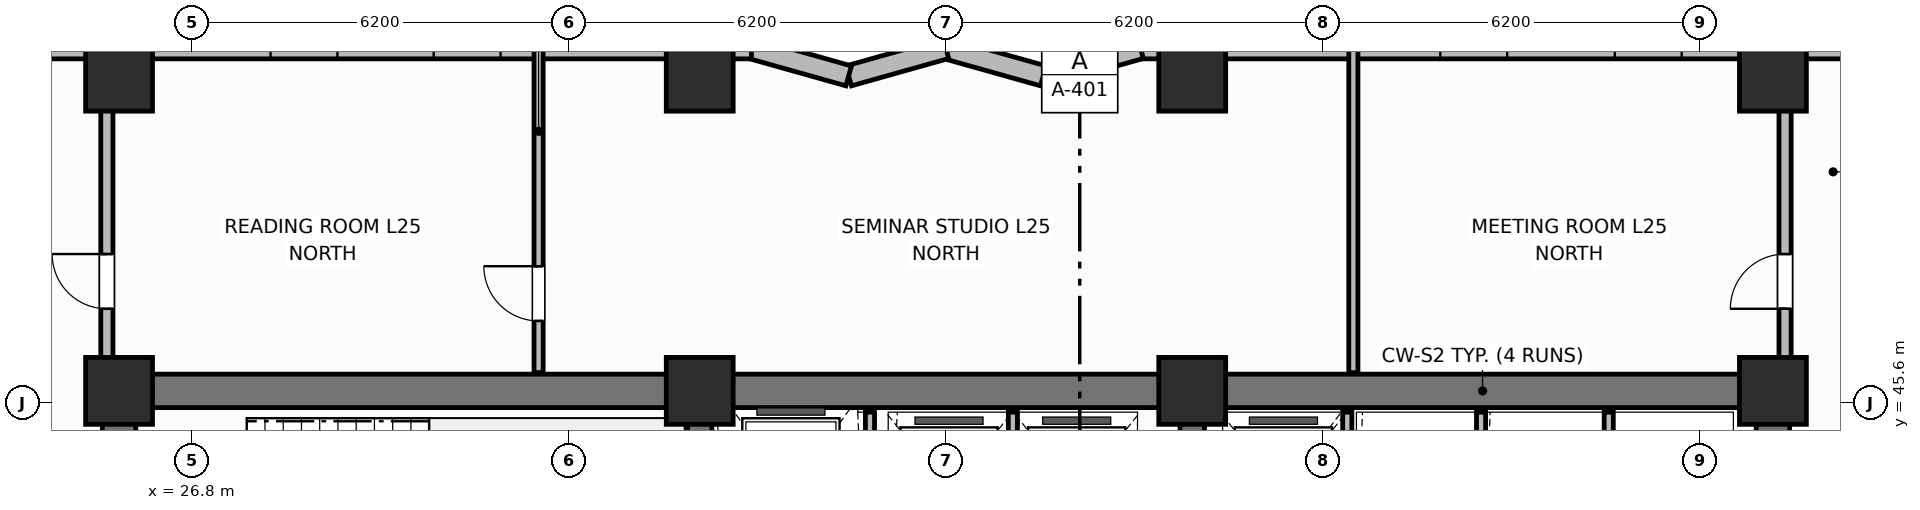
"""IFC4 building model, lengths in metres.
Left out: names, types, materials, properties, quantities, classifications, styles, units other than length and angle.
Written with IfcOpenShell. Run it as: python <this file> out.ifc"""

import sys

from ifc_helpers import new_model, si_unit, direction, frame, frame_2d, origin, origin_2d, place, context, subcontext, project, spatial, rectangle, extrude, element, fill, save


model = new_model("IFC4")
c1 = context("Model", 3, precision=1e-05, world=origin(), true_north=direction((0.0, 1.0)))
c2 = subcontext(c1, "Body", "Model", "MODEL_VIEW")
j1 = project(units=[si_unit("LENGTHUNIT", "METRE"), si_unit("PLANEANGLEUNIT", "RADIAN")], contexts=[c1])
p1 = place(None, origin())
s1 = spatial("IfcSite", under=j1, at=p1, CompositionType="ELEMENT")
p2 = place(p1, origin())
s2 = spatial("IfcBuilding", under=s1, at=p2, CompositionType="ELEMENT")
p3 = place(p2, frame((0.0, 0.0, 103.1)))
s3 = spatial("IfcBuildingStorey", under=s2, at=p3, CompositionType="ELEMENT", Elevation=103.1)
p4 = place(p3, frame((25.6, 45.8, 0.0), z_axis=(0.0, 0.0, 1.0), x_axis=(1.0, 0.0, 0.0)))
e1 = element("IfcWall", 1, at=p4, inside=s3, PredefinedType="SHEAR", context=c2, shape_type="SweptSolid", body=[
    extrude(rectangle(XDim=27.2, YDim=0.55, at=frame_2d((13.6, 0.0))), origin(), (0.0, 0.0, 1.0), 3.7),
])
for number, where, z_axis, x_axis in (
    (2, (25.6, 39.875, 0.0), (0.0, 0.0, 1.0), (0.0, 1.0, 0.0)),
    (3, (52.8, 39.875, 0.0), (0.0, 0.0, 1.0), (0.0, 1.0, 0.0)),
):
    element("IfcWall", number, at=place(p3, frame(where, z_axis=z_axis, x_axis=x_axis)), inside=s3, PredefinedType="SHEAR", context=c2, shape_type="SweptSolid", body=[
        extrude(rectangle(XDim=5.65, YDim=0.55, at=frame_2d((2.825, 0.0))), origin(), (0.0, 0.0, 1.0), 3.7),
    ])
for number, where, z_axis, x_axis in (
    (4, (35.15, 39.875, 0.0), (0.0, 0.0, 1.0), (0.0, 1.0, 0.0)),
    (5, (43.25, 39.875, 0.0), (0.0, 0.0, 1.0), (0.0, 1.0, 0.0)),
):
    element("IfcWall", number, at=place(p3, frame(where, z_axis=z_axis, x_axis=x_axis)), inside=s3, PredefinedType="SHEAR", context=c2, shape_type="SweptSolid", body=[
        extrude(rectangle(XDim=5.65, YDim=0.4, at=frame_2d((2.825, 0.0))), origin(), (0.0, 0.0, 1.0), 3.7),
    ])
for number, where, z_axis, x_axis in (
    (6, (25.6, 45.8, 0.0), (0.0, 0.0, 1.0), (1.0, 0.0, 0.0)),
    (7, (35.15, 45.8, 0.0), (0.0, 0.0, 1.0), (1.0, 0.0, 0.0)),
    (8, (43.25, 45.8, 0.0), (0.0, 0.0, 1.0), (1.0, 0.0, 0.0)),
    (9, (52.8, 45.8, 0.0), (0.0, 0.0, 1.0), (1.0, 0.0, 0.0)),
    (10, (25.6, 50.95, 0.0), (0.0, 0.0, 1.0), (1.0, 0.0, 0.0)),
    (11, (35.15, 50.95, 0.0), (0.0, 0.0, 1.0), (1.0, 0.0, 0.0)),
    (12, (43.25, 50.95, 0.0), (0.0, 0.0, 1.0), (1.0, 0.0, 0.0)),
    (13, (52.8, 50.95, 0.0), (0.0, 0.0, 1.0), (1.0, 0.0, 0.0)),
):
    element("IfcColumn", number, at=place(p3, frame(where, z_axis=z_axis, x_axis=x_axis)), inside=s3, PredefinedType="COLUMN", context=c2, shape_type="SweptSolid", body=[
        extrude(rectangle(XDim=1.1, YDim=1.1, at=origin_2d()), origin(), (0.0, 0.0, 1.0), 3.7),
    ])
p5 = place(p3, frame((59.8, 51.43, 0.0), z_axis=(0.0, 0.0, 1.0), x_axis=(-1.0, 0.0, 0.0)))
e14 = element("IfcWall", 14, at=p5, inside=s3, PredefinedType="SOLIDWALL", context=c2, shape_type="SweptSolid", body=[
    extrude(rectangle(XDim=17.4, YDim=0.34, at=frame_2d((8.7, 0.0))), origin(), (0.0, 0.0, 1.0), 2.7),
])
p6 = place(p5, frame((1.71, 0.0, 0.93)))
e15 = element("IfcOpeningElement", 15, at=p6, cuts=e14, PredefinedType="OPENING", context=c2, shape_type="SweptSolid", body=[
    extrude(rectangle(XDim=1.1, YDim=1.65, at=frame_2d((0.55, 0.825))), frame((0.0, 0.18, 0.0), z_axis=(0.0, -1.0, 0.0), x_axis=(1.0, 0.0, 0.0)), (0.0, 0.0, 1.0), 0.36),
])
p7 = place(p5, frame((8.5, 0.0, 0.93)))
e16 = element("IfcOpeningElement", 16, at=p7, cuts=e14, PredefinedType="OPENING", context=c2, shape_type="SweptSolid", body=[
    extrude(rectangle(XDim=1.1, YDim=1.65, at=frame_2d((0.55, 0.825))), frame((0.0, 0.18, 0.0), z_axis=(0.0, -1.0, 0.0), x_axis=(1.0, 0.0, 0.0)), (0.0, 0.0, 1.0), 0.36),
])
p8 = place(p5, frame((11.37, 0.0, 0.93)))
e17 = element("IfcOpeningElement", 17, at=p8, cuts=e14, PredefinedType="OPENING", context=c2, shape_type="SweptSolid", body=[
    extrude(rectangle(XDim=1.1, YDim=1.65, at=frame_2d((0.55, 0.825))), frame((0.0, 0.18, 0.0), z_axis=(0.0, -1.0, 0.0), x_axis=(1.0, 0.0, 0.0)), (0.0, 0.0, 1.0), 0.36),
])
p9 = place(p3, frame((42.4, 51.43, 0.0), z_axis=(0.0, 0.0, 1.0), x_axis=(-0.962652136636, -0.270741322725, 0.0)))
e18 = element("IfcWall", 18, at=p9, inside=s3, PredefinedType="SOLIDWALL", context=c2, shape_type="SweptSolid", body=[
    extrude(rectangle(XDim=1.662, YDim=0.34, at=frame_2d((0.831, 0.0))), origin(), (0.0, 0.0, 1.0), 2.7),
])
p10 = place(p3, frame((40.8, 50.98, 0.0), z_axis=(0.0, 0.0, 1.0), x_axis=(-0.962662902433, 0.270703040766, 0.0)))
e19 = element("IfcWall", 19, at=p10, inside=s3, PredefinedType="SOLIDWALL", context=c2, shape_type="SweptSolid", body=[
    extrude(rectangle(XDim=1.662, YDim=0.34, at=frame_2d((0.831, 0.0))), origin(), (0.0, 0.0, 1.0), 2.7),
])
p11 = place(p3, frame((39.2, 51.43, 0.0), z_axis=(0.0, 0.0, 1.0), x_axis=(-0.962652136636, -0.270741322725, 0.0)))
e20 = element("IfcWall", 20, at=p11, inside=s3, PredefinedType="SOLIDWALL", context=c2, shape_type="SweptSolid", body=[
    extrude(rectangle(XDim=1.662, YDim=0.34, at=frame_2d((0.831, 0.0))), origin(), (0.0, 0.0, 1.0), 2.7),
])
p12 = place(p3, frame((37.6, 50.98, 0.0), z_axis=(0.0, 0.0, 1.0), x_axis=(-0.962662902433, 0.270703040766, 0.0)))
e21 = element("IfcWall", 21, at=p12, inside=s3, PredefinedType="SOLIDWALL", context=c2, shape_type="SweptSolid", body=[
    extrude(rectangle(XDim=1.662, YDim=0.34, at=frame_2d((0.831, 0.0))), origin(), (0.0, 0.0, 1.0), 2.7),
])
p13 = place(p3, frame((36.0, 51.43, 0.0), z_axis=(0.0, 0.0, 1.0), x_axis=(-1.0, 0.0, 0.0)))
e22 = element("IfcWall", 22, at=p13, inside=s3, PredefinedType="SOLIDWALL", context=c2, shape_type="SweptSolid", body=[
    extrude(rectangle(XDim=17.4, YDim=0.34, at=frame_2d((8.7, 0.0))), origin(), (0.0, 0.0, 1.0), 2.7),
])
p14 = place(p13, frame((4.125, 0.0, 0.93)))
e23 = element("IfcOpeningElement", 23, at=p14, cuts=e22, PredefinedType="OPENING", context=c2, shape_type="SweptSolid", body=[
    extrude(rectangle(XDim=1.1, YDim=1.65, at=frame_2d((0.55, 0.825))), frame((0.0, 0.18, 0.0), z_axis=(0.0, -1.0, 0.0), x_axis=(1.0, 0.0, 0.0)), (0.0, 0.0, 1.0), 0.36),
])
p15 = place(p13, frame((6.808, 0.0, 0.93)))
e24 = element("IfcOpeningElement", 24, at=p15, cuts=e22, PredefinedType="OPENING", context=c2, shape_type="SweptSolid", body=[
    extrude(rectangle(XDim=1.1, YDim=1.65, at=frame_2d((0.55, 0.825))), frame((0.0, 0.18, 0.0), z_axis=(0.0, -1.0, 0.0), x_axis=(1.0, 0.0, 0.0)), (0.0, 0.0, 1.0), 0.36),
])
p16 = place(p13, frame((11.825, 0.0, 0.93)))
e25 = element("IfcOpeningElement", 25, at=p16, cuts=e22, PredefinedType="OPENING", context=c2, shape_type="SweptSolid", body=[
    extrude(rectangle(XDim=1.1, YDim=1.65, at=frame_2d((0.55, 0.825))), frame((0.0, 0.18, 0.0), z_axis=(0.0, -1.0, 0.0), x_axis=(1.0, 0.0, 0.0)), (0.0, 0.0, 1.0), 0.36),
])
p17 = place(p13, frame((14.858, 0.0, 0.93)))
e26 = element("IfcOpeningElement", 26, at=p17, cuts=e22, PredefinedType="OPENING", context=c2, shape_type="SweptSolid", body=[
    extrude(rectangle(XDim=1.1, YDim=1.65, at=frame_2d((0.55, 0.825))), frame((0.0, 0.18, 0.0), z_axis=(0.0, -1.0, 0.0), x_axis=(1.0, 0.0, 0.0)), (0.0, 0.0, 1.0), 0.36),
])
p18 = place(p3, frame((37.95, 42.6, 0.0), z_axis=(0.0, 0.0, 1.0), x_axis=(0.0, 1.0, 0.0)))
e27 = element("IfcWall", 27, at=p18, inside=s3, PredefinedType="PARTITIONING", context=c2, shape_type="SweptSolid", body=[
    extrude(rectangle(XDim=2.85, YDim=0.15, at=frame_2d((1.425, 0.0))), origin(), (0.0, 0.0, 1.0), 2.53),
])
for number, where, z_axis, x_axis in (
    (28, (40.3, 42.65, 0.0), (0.0, 0.0, 1.0), (0.0, 1.0, 0.0)),
    (29, (45.8, 42.65, 0.0), (0.0, 0.0, 1.0), (0.0, 1.0, 0.0)),
    (30, (48.0, 42.65, 0.0), (0.0, 0.0, 1.0), (0.0, 1.0, 0.0)),
    (31, (50.1, 42.65, 0.0), (0.0, 0.0, 1.0), (0.0, 1.0, 0.0)),
):
    element("IfcWall", number, at=place(p3, frame(where, z_axis=z_axis, x_axis=x_axis)), inside=s3, PredefinedType="PARTITIONING", context=c2, shape_type="SweptSolid", body=[
        extrude(rectangle(XDim=2.8, YDim=0.15, at=frame_2d((1.4, 0.0))), origin(), (0.0, 0.0, 1.0), 2.53),
    ])
p19 = place(p3, frame((32.5, 46.1, 0.0), z_axis=(0.0, 0.0, 1.0), x_axis=(0.0, 1.0, 0.0)))
e32 = element("IfcWall", 32, at=p19, inside=s3, PredefinedType="PARTITIONING", context=c2, shape_type="SweptSolid", body=[
    extrude(rectangle(XDim=5.33, YDim=0.15, at=frame_2d((2.665, 0.0))), origin(), (0.0, 0.0, 1.0), 2.53),
])
p20 = place(p19, frame((0.85, 0.0, 0.0)))
e33 = element("IfcOpeningElement", 33, at=p20, cuts=e32, PredefinedType="OPENING", context=c2, shape_type="SweptSolid", body=[
    extrude(rectangle(XDim=0.9, YDim=2.1, at=frame_2d((0.45, 1.05))), frame((0.0, 0.085, 0.0), z_axis=(0.0, -1.0, 0.0), x_axis=(1.0, 0.0, 0.0)), (0.0, 0.0, 1.0), 0.17),
])
p21 = place(p3, frame((45.9, 46.1, 0.0), z_axis=(0.0, 0.0, 1.0), x_axis=(0.0, 1.0, 0.0)))
e34 = element("IfcWall", 34, at=p21, inside=s3, PredefinedType="PARTITIONING", context=c2, shape_type="SweptSolid", body=[
    extrude(rectangle(XDim=5.33, YDim=0.15, at=frame_2d((2.665, 0.0))), origin(), (0.0, 0.0, 1.0), 2.53),
])
p22 = place(p3, frame((25.4, 46.1, 0.0), z_axis=(0.0, 0.0, 1.0), x_axis=(0.0, 1.0, 0.0)))
e35 = element("IfcWall", 35, at=p22, inside=s3, PredefinedType="PARTITIONING", context=c2, shape_type="SweptSolid", body=[
    extrude(rectangle(XDim=4.33, YDim=0.2, at=frame_2d((2.165, 0.0))), origin(), (0.0, 0.0, 1.0), 2.53),
])
p23 = place(p22, frame((1.05, 0.0, 0.0)))
e36 = element("IfcOpeningElement", 36, at=p23, cuts=e35, PredefinedType="OPENING", context=c2, shape_type="SweptSolid", body=[
    extrude(rectangle(XDim=0.9, YDim=2.1, at=frame_2d((0.45, 1.05))), frame((0.0, 0.11, 0.0), z_axis=(0.0, -1.0, 0.0), x_axis=(1.0, 0.0, 0.0)), (0.0, 0.0, 1.0), 0.22),
])
p24 = place(p3, frame((53.0, 46.1, 0.0), z_axis=(0.0, 0.0, 1.0), x_axis=(0.0, 1.0, 0.0)))
e37 = element("IfcWall", 37, at=p24, inside=s3, PredefinedType="PARTITIONING", context=c2, shape_type="SweptSolid", body=[
    extrude(rectangle(XDim=4.33, YDim=0.2, at=frame_2d((2.165, 0.0))), origin(), (0.0, 0.0, 1.0), 2.53),
])
p25 = place(p24, frame((1.05, 0.0, 0.0)))
e38 = element("IfcOpeningElement", 38, at=p25, cuts=e37, PredefinedType="OPENING", context=c2, shape_type="SweptSolid", body=[
    extrude(rectangle(XDim=0.9, YDim=2.1, at=frame_2d((0.45, 1.05))), frame((0.0, 0.11, 0.0), z_axis=(0.0, -1.0, 0.0), x_axis=(1.0, 0.0, 0.0)), (0.0, 0.0, 1.0), 0.22),
])
p26 = place(p20, origin())
e39 = element("IfcDoor", 39, at=p26, inside=s3, OperationType="SINGLE_SWING_RIGHT", PredefinedType="DOOR", context=c2, shape_type="SweptSolid", body=[
    extrude(rectangle(XDim=0.9, YDim=2.1, at=frame_2d((0.45, 1.05))), frame((0.0, 0.025, 0.0), z_axis=(0.0, -1.0, 0.0), x_axis=(1.0, 0.0, 0.0)), (0.0, 0.0, 1.0), 0.05),
])
fill(e33, e39)
p27 = place(p23, origin())
e40 = element("IfcDoor", 40, at=p27, inside=s3, OperationType="SINGLE_SWING_RIGHT", PredefinedType="DOOR", context=c2, shape_type="SweptSolid", body=[
    extrude(rectangle(XDim=0.9, YDim=2.1, at=frame_2d((0.45, 1.05))), frame((0.0, 0.025, 0.0), z_axis=(0.0, -1.0, 0.0), x_axis=(1.0, 0.0, 0.0)), (0.0, 0.0, 1.0), 0.05),
])
fill(e36, e40)
p28 = place(p25, origin())
e41 = element("IfcDoor", 41, at=p28, inside=s3, OperationType="SINGLE_SWING_LEFT", PredefinedType="DOOR", context=c2, shape_type="SweptSolid", body=[
    extrude(rectangle(XDim=0.9, YDim=2.1, at=frame_2d((0.45, 1.05))), frame((0.0, 0.025, 0.0), z_axis=(0.0, -1.0, 0.0), x_axis=(1.0, 0.0, 0.0)), (0.0, 0.0, 1.0), 0.05),
])
fill(e38, e41)
save(model, sys.argv[1])
